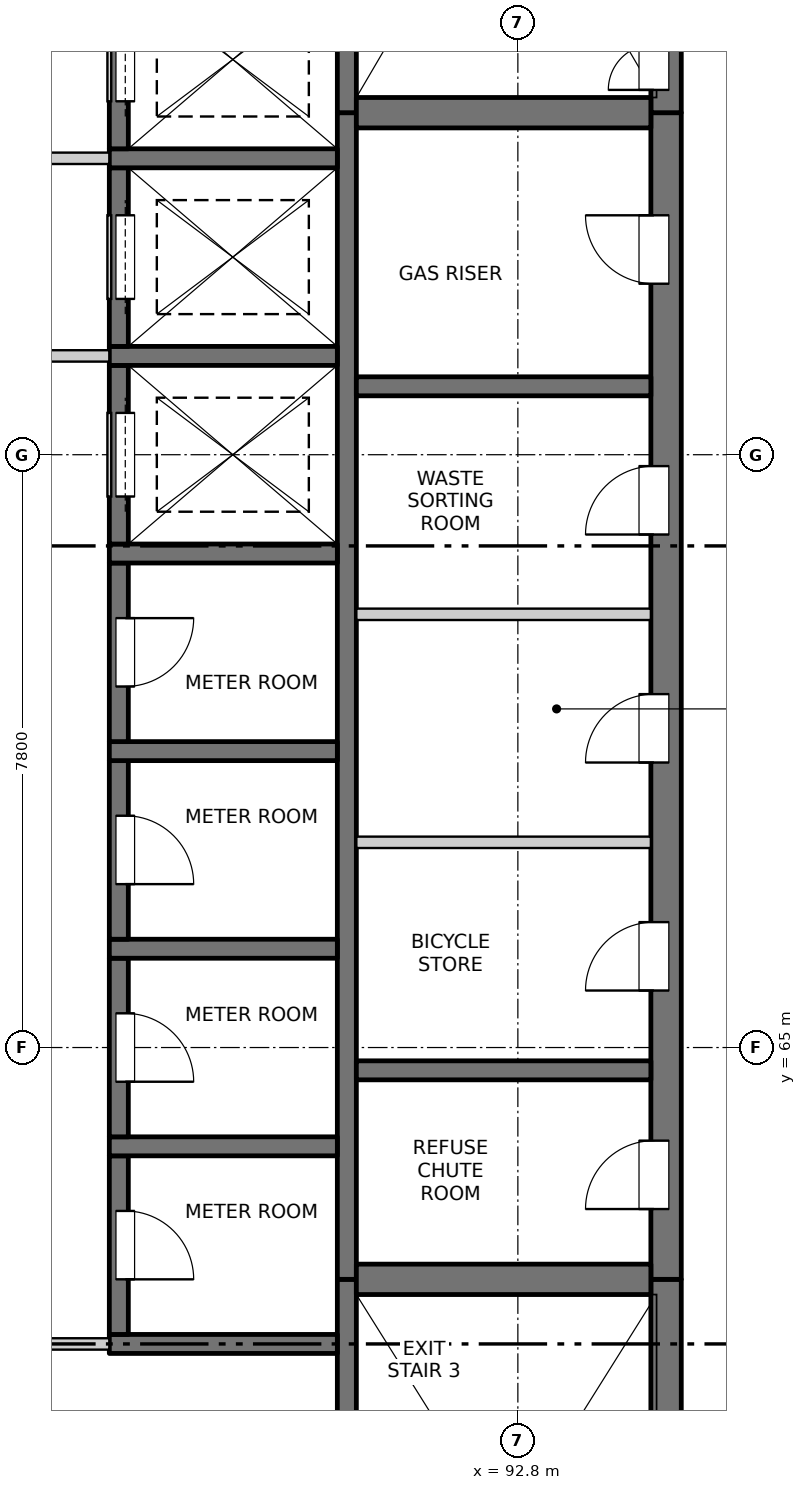
"""IFC4 building model, lengths in metres.
Left out: names, types, materials, properties, quantities, classifications, styles, units other than length and angle.
Written with IfcOpenShell. Run it as: python <this file> out.ifc"""

import sys

from ifc_helpers import new_model, si_unit, direction, frame, frame_2d, origin, place, context, subcontext, project, spatial, rectangle, extrude, element, fill, save


model = new_model("IFC4")
c1 = context("Model", 3, precision=1e-05, world=origin(), true_north=direction((0.0, 1.0)))
c2 = subcontext(c1, "Body", "Model", "MODEL_VIEW")
j1 = project(units=[si_unit("LENGTHUNIT", "METRE"), si_unit("PLANEANGLEUNIT", "RADIAN")], contexts=[c1])
p1 = place(None, origin())
s1 = spatial("IfcSite", under=j1, at=p1, CompositionType="ELEMENT")
p2 = place(p1, origin())
s2 = spatial("IfcBuilding", under=s1, at=p2, CompositionType="ELEMENT")
p3 = place(p2, frame((0.0, 0.0, 256.2)))
s3 = spatial("IfcBuildingStorey", under=s2, at=p3, CompositionType="ELEMENT", Elevation=256.2)
p4 = place(p3, frame((94.75, 55.05, -0.25), z_axis=(0.0, 0.0, 1.0), x_axis=(0.0, 1.0, 0.0)))
e1 = element("IfcWall", 1, at=p4, inside=s3, PredefinedType="SOLIDWALL", context=c2, shape_type="SweptSolid", body=[
    extrude(rectangle(XDim=6.9, YDim=0.4, at=frame_2d((3.45, 0.0))), origin(), (0.0, 0.0, 1.0), 3.4),
])
p5 = place(p4, frame((0.6, 0.0, 0.25)))
e2 = element("IfcOpeningElement", 2, at=p5, cuts=e1, PredefinedType="OPENING", context=c2, shape_type="SweptSolid", body=[
    extrude(rectangle(XDim=1.2, YDim=2.1, at=frame_2d((0.6, 1.05))), frame((0.0, 0.21, 0.0), z_axis=(0.0, -1.0, 0.0), x_axis=(1.0, 0.0, 0.0)), (0.0, 0.0, 1.0), 0.42),
])
p6 = place(p3, frame((94.75, 61.95, -0.25), z_axis=(0.0, 0.0, 1.0), x_axis=(0.0, 1.0, 0.0)))
e3 = element("IfcWall", 3, at=p6, inside=s3, PredefinedType="SOLIDWALL", context=c2, shape_type="SweptSolid", body=[
    extrude(rectangle(XDim=15.35, YDim=0.4, at=frame_2d((7.675, 0.0))), origin(), (0.0, 0.0, 1.0), 3.4),
])
p7 = place(p6, frame((0.925, 0.0, 0.25)))
e4 = element("IfcOpeningElement", 4, at=p7, cuts=e3, PredefinedType="OPENING", context=c2, shape_type="SweptSolid", body=[
    extrude(rectangle(XDim=0.9, YDim=2.1, at=frame_2d((0.45, 1.05))), frame((0.0, 0.21, 0.0), z_axis=(0.0, -1.0, 0.0), x_axis=(1.0, 0.0, 0.0)), (0.0, 0.0, 1.0), 0.42),
])
p8 = place(p6, frame((3.8, 0.0, 0.25)))
e5 = element("IfcOpeningElement", 5, at=p8, cuts=e3, PredefinedType="OPENING", context=c2, shape_type="SweptSolid", body=[
    extrude(rectangle(XDim=0.9, YDim=2.1, at=frame_2d((0.45, 1.05))), frame((0.0, 0.21, 0.0), z_axis=(0.0, -1.0, 0.0), x_axis=(1.0, 0.0, 0.0)), (0.0, 0.0, 1.0), 0.42),
])
p9 = place(p6, frame((6.8, 0.0, 0.25)))
e6 = element("IfcOpeningElement", 6, at=p9, cuts=e3, PredefinedType="OPENING", context=c2, shape_type="SweptSolid", body=[
    extrude(rectangle(XDim=0.9, YDim=2.1, at=frame_2d((0.45, 1.05))), frame((0.0, 0.21, 0.0), z_axis=(0.0, -1.0, 0.0), x_axis=(1.0, 0.0, 0.0)), (0.0, 0.0, 1.0), 0.42),
])
p10 = place(p6, frame((9.8, 0.0, 0.25)))
e7 = element("IfcOpeningElement", 7, at=p10, cuts=e3, PredefinedType="OPENING", context=c2, shape_type="SweptSolid", body=[
    extrude(rectangle(XDim=0.9, YDim=2.1, at=frame_2d((0.45, 1.05))), frame((0.0, 0.21, 0.0), z_axis=(0.0, -1.0, 0.0), x_axis=(1.0, 0.0, 0.0)), (0.0, 0.0, 1.0), 0.42),
])
p11 = place(p6, frame((13.1, 0.0, 0.25)))
e8 = element("IfcOpeningElement", 8, at=p11, cuts=e3, PredefinedType="OPENING", context=c2, shape_type="SweptSolid", body=[
    extrude(rectangle(XDim=0.9, YDim=2.1, at=frame_2d((0.45, 1.05))), frame((0.0, 0.21, 0.0), z_axis=(0.0, -1.0, 0.0), x_axis=(1.0, 0.0, 0.0)), (0.0, 0.0, 1.0), 0.42),
])
p12 = place(p3, frame((94.75, 77.3, -0.25), z_axis=(0.0, 0.0, 1.0), x_axis=(0.0, 1.0, 0.0)))
e9 = element("IfcWall", 9, at=p12, inside=s3, PredefinedType="SOLIDWALL", context=c2, shape_type="SweptSolid", body=[
    extrude(rectangle(XDim=7.4, YDim=0.4, at=frame_2d((3.7, 0.0))), origin(), (0.0, 0.0, 1.0), 3.4),
])
p13 = place(p12, frame((0.3, 0.0, 0.25)))
e10 = element("IfcOpeningElement", 10, at=p13, cuts=e9, PredefinedType="OPENING", context=c2, shape_type="SweptSolid", body=[
    extrude(rectangle(XDim=1.2, YDim=2.1, at=frame_2d((0.6, 1.05))), frame((0.0, 0.21, 0.0), z_axis=(0.0, -1.0, 0.0), x_axis=(1.0, 0.0, 0.0)), (0.0, 0.0, 1.0), 0.42),
])
p14 = place(p3, frame((90.55, 55.45, -0.25), z_axis=(0.0, 0.0, 1.0), x_axis=(0.0, 1.0, 0.0)))
e11 = element("IfcWall", 11, at=p14, inside=s3, PredefinedType="SOLIDWALL", context=c2, shape_type="SweptSolid", body=[
    extrude(rectangle(XDim=6.5, YDim=0.25, at=frame_2d((3.25, 0.0))), origin(), (0.0, 0.0, 1.0), 3.4),
])
p15 = place(p14, frame((0.2, 0.0, 0.25)))
e12 = element("IfcOpeningElement", 12, at=p15, cuts=e11, PredefinedType="OPENING", context=c2, shape_type="SweptSolid", body=[
    extrude(rectangle(XDim=1.2, YDim=2.1, at=frame_2d((0.6, 1.05))), frame((0.0, 0.135, 0.0), z_axis=(0.0, -1.0, 0.0), x_axis=(1.0, 0.0, 0.0)), (0.0, 0.0, 1.0), 0.27),
])
p16 = place(p3, frame((90.55, 61.95, -0.25), z_axis=(0.0, 0.0, 1.0), x_axis=(0.0, 1.0, 0.0)))
e13 = element("IfcWall", 13, at=p16, inside=s3, PredefinedType="SOLIDWALL", context=c2, shape_type="SweptSolid", body=[
    extrude(rectangle(XDim=15.35, YDim=0.25, at=frame_2d((7.675, 0.0))), origin(), (0.0, 0.0, 1.0), 3.4),
])
p17 = place(p3, frame((90.55, 77.3, -0.25), z_axis=(0.0, 0.0, 1.0), x_axis=(0.0, 1.0, 0.0)))
e14 = element("IfcWall", 14, at=p17, inside=s3, PredefinedType="SOLIDWALL", context=c2, shape_type="SweptSolid", body=[
    extrude(rectangle(XDim=7.0, YDim=0.25, at=frame_2d((3.5, 0.0))), origin(), (0.0, 0.0, 1.0), 3.4),
])
p18 = place(p3, frame((87.425, 61.1, -0.25), z_axis=(0.0, 0.0, 1.0), x_axis=(1.0, 0.0, 0.0)))
e15 = element("IfcWall", 15, at=p18, inside=s3, PredefinedType="SOLIDWALL", context=c2, shape_type="SweptSolid", body=[
    extrude(rectangle(XDim=3.0, YDim=0.25, at=frame_2d((1.5, 0.0))), origin(), (0.0, 0.0, 1.0), 3.4),
])
p19 = place(p3, frame((87.55, 61.225, -0.25), z_axis=(0.0, 0.0, 1.0), x_axis=(0.0, 1.0, 0.0)))
e16 = element("IfcWall", 16, at=p19, inside=s3, PredefinedType="SOLIDWALL", context=c2, shape_type="SweptSolid", body=[
    extrude(rectangle(XDim=2.35, YDim=0.25, at=frame_2d((1.175, 0.0))), origin(), (0.0, 0.0, 1.0), 3.4),
])
p20 = place(p19, frame((0.725, 0.0, 0.25)))
e17 = element("IfcOpeningElement", 17, at=p20, cuts=e16, PredefinedType="OPENING", context=c2, shape_type="SweptSolid", body=[
    extrude(rectangle(XDim=0.9, YDim=2.1, at=frame_2d((0.45, 1.05))), frame((0.0, 0.135, 0.0), z_axis=(0.0, -1.0, 0.0), x_axis=(1.0, 0.0, 0.0)), (0.0, 0.0, 1.0), 0.27),
])
p21 = place(p3, frame((87.425, 63.7, -0.25), z_axis=(0.0, 0.0, 1.0), x_axis=(1.0, 0.0, 0.0)))
e18 = element("IfcWall", 18, at=p21, inside=s3, PredefinedType="SOLIDWALL", context=c2, shape_type="SweptSolid", body=[
    extrude(rectangle(XDim=3.0, YDim=0.25, at=frame_2d((1.5, 0.0))), origin(), (0.0, 0.0, 1.0), 3.4),
])
p22 = place(p3, frame((87.55, 63.825, -0.25), z_axis=(0.0, 0.0, 1.0), x_axis=(0.0, 1.0, 0.0)))
e19 = element("IfcWall", 19, at=p22, inside=s3, PredefinedType="SOLIDWALL", context=c2, shape_type="SweptSolid", body=[
    extrude(rectangle(XDim=2.35, YDim=0.25, at=frame_2d((1.175, 0.0))), origin(), (0.0, 0.0, 1.0), 3.4),
])
p23 = place(p22, frame((0.725, 0.0, 0.25)))
e20 = element("IfcOpeningElement", 20, at=p23, cuts=e19, PredefinedType="OPENING", context=c2, shape_type="SweptSolid", body=[
    extrude(rectangle(XDim=0.9, YDim=2.1, at=frame_2d((0.45, 1.05))), frame((0.0, 0.135, 0.0), z_axis=(0.0, -1.0, 0.0), x_axis=(1.0, 0.0, 0.0)), (0.0, 0.0, 1.0), 0.27),
])
p24 = place(p3, frame((87.425, 66.3, -0.25), z_axis=(0.0, 0.0, 1.0), x_axis=(1.0, 0.0, 0.0)))
e21 = element("IfcWall", 21, at=p24, inside=s3, PredefinedType="SOLIDWALL", context=c2, shape_type="SweptSolid", body=[
    extrude(rectangle(XDim=3.0, YDim=0.25, at=frame_2d((1.5, 0.0))), origin(), (0.0, 0.0, 1.0), 3.4),
])
p25 = place(p3, frame((87.55, 66.425, -0.25), z_axis=(0.0, 0.0, 1.0), x_axis=(0.0, 1.0, 0.0)))
e22 = element("IfcWall", 22, at=p25, inside=s3, PredefinedType="SOLIDWALL", context=c2, shape_type="SweptSolid", body=[
    extrude(rectangle(XDim=2.35, YDim=0.25, at=frame_2d((1.175, 0.0))), origin(), (0.0, 0.0, 1.0), 3.4),
])
p26 = place(p25, frame((0.725, 0.0, 0.25)))
e23 = element("IfcOpeningElement", 23, at=p26, cuts=e22, PredefinedType="OPENING", context=c2, shape_type="SweptSolid", body=[
    extrude(rectangle(XDim=0.9, YDim=2.1, at=frame_2d((0.45, 1.05))), frame((0.0, 0.135, 0.0), z_axis=(0.0, -1.0, 0.0), x_axis=(1.0, 0.0, 0.0)), (0.0, 0.0, 1.0), 0.27),
])
p27 = place(p3, frame((87.425, 68.9, -0.25), z_axis=(0.0, 0.0, 1.0), x_axis=(1.0, 0.0, 0.0)))
e24 = element("IfcWall", 24, at=p27, inside=s3, PredefinedType="SOLIDWALL", context=c2, shape_type="SweptSolid", body=[
    extrude(rectangle(XDim=3.0, YDim=0.25, at=frame_2d((1.5, 0.0))), origin(), (0.0, 0.0, 1.0), 3.4),
])
p28 = place(p3, frame((87.55, 69.025, -0.25), z_axis=(0.0, 0.0, 1.0), x_axis=(0.0, 1.0, 0.0)))
e25 = element("IfcWall", 25, at=p28, inside=s3, PredefinedType="SOLIDWALL", context=c2, shape_type="SweptSolid", body=[
    extrude(rectangle(XDim=2.35, YDim=0.25, at=frame_2d((1.175, 0.0))), origin(), (0.0, 0.0, 1.0), 3.4),
])
p29 = place(p28, frame((0.725, 0.0, 0.25)))
e26 = element("IfcOpeningElement", 26, at=p29, cuts=e25, PredefinedType="OPENING", context=c2, shape_type="SweptSolid", body=[
    extrude(rectangle(XDim=0.9, YDim=2.1, at=frame_2d((0.45, 1.05))), frame((0.0, 0.135, 0.0), z_axis=(0.0, -1.0, 0.0), x_axis=(1.0, 0.0, 0.0)), (0.0, 0.0, 1.0), 0.27),
])
p30 = place(p3, frame((87.425, 71.5, -0.25), z_axis=(0.0, 0.0, 1.0), x_axis=(1.0, 0.0, 0.0)))
e27 = element("IfcWall", 27, at=p30, inside=s3, PredefinedType="SOLIDWALL", context=c2, shape_type="SweptSolid", body=[
    extrude(rectangle(XDim=3.0, YDim=0.25, at=frame_2d((1.5, 0.0))), origin(), (0.0, 0.0, 1.0), 3.4),
])
p31 = place(p3, frame((87.55, 71.625, -0.25), z_axis=(0.0, 0.0, 1.0), x_axis=(0.0, 1.0, 0.0)))
e28 = element("IfcWall", 28, at=p31, inside=s3, PredefinedType="SOLIDWALL", context=c2, shape_type="SweptSolid", body=[
    extrude(rectangle(XDim=2.35, YDim=0.25, at=frame_2d((1.175, 0.0))), origin(), (0.0, 0.0, 1.0), 3.4),
])
p32 = place(p31, frame((0.625, 0.0, 0.25)))
e29 = element("IfcOpeningElement", 29, at=p32, cuts=e28, PredefinedType="OPENING", context=c2, shape_type="SweptSolid", body=[
    extrude(rectangle(XDim=1.1, YDim=2.1, at=frame_2d((0.55, 1.05))), frame((0.0, 0.135, 0.0), z_axis=(0.0, -1.0, 0.0), x_axis=(1.0, 0.0, 0.0)), (0.0, 0.0, 1.0), 0.27),
])
p33 = place(p3, frame((87.425, 74.1, -0.25), z_axis=(0.0, 0.0, 1.0), x_axis=(1.0, 0.0, 0.0)))
e30 = element("IfcWall", 30, at=p33, inside=s3, PredefinedType="SOLIDWALL", context=c2, shape_type="SweptSolid", body=[
    extrude(rectangle(XDim=3.0, YDim=0.25, at=frame_2d((1.5, 0.0))), origin(), (0.0, 0.0, 1.0), 3.4),
])
p34 = place(p3, frame((87.55, 74.225, -0.25), z_axis=(0.0, 0.0, 1.0), x_axis=(0.0, 1.0, 0.0)))
e31 = element("IfcWall", 31, at=p34, inside=s3, PredefinedType="SOLIDWALL", context=c2, shape_type="SweptSolid", body=[
    extrude(rectangle(XDim=2.35, YDim=0.25, at=frame_2d((1.175, 0.0))), origin(), (0.0, 0.0, 1.0), 3.4),
])
p35 = place(p34, frame((0.625, 0.0, 0.25)))
e32 = element("IfcOpeningElement", 32, at=p35, cuts=e31, PredefinedType="OPENING", context=c2, shape_type="SweptSolid", body=[
    extrude(rectangle(XDim=1.1, YDim=2.1, at=frame_2d((0.55, 1.05))), frame((0.0, 0.135, 0.0), z_axis=(0.0, -1.0, 0.0), x_axis=(1.0, 0.0, 0.0)), (0.0, 0.0, 1.0), 0.27),
])
p36 = place(p3, frame((87.425, 76.7, -0.25), z_axis=(0.0, 0.0, 1.0), x_axis=(1.0, 0.0, 0.0)))
e33 = element("IfcWall", 33, at=p36, inside=s3, PredefinedType="SOLIDWALL", context=c2, shape_type="SweptSolid", body=[
    extrude(rectangle(XDim=3.0, YDim=0.25, at=frame_2d((1.5, 0.0))), origin(), (0.0, 0.0, 1.0), 3.4),
])
p37 = place(p3, frame((87.55, 76.825, -0.25), z_axis=(0.0, 0.0, 1.0), x_axis=(0.0, 1.0, 0.0)))
e34 = element("IfcWall", 34, at=p37, inside=s3, PredefinedType="SOLIDWALL", context=c2, shape_type="SweptSolid", body=[
    extrude(rectangle(XDim=2.35, YDim=0.25, at=frame_2d((1.175, 0.0))), origin(), (0.0, 0.0, 1.0), 3.4),
])
p38 = place(p37, frame((0.625, 0.0, 0.25)))
e35 = element("IfcOpeningElement", 35, at=p38, cuts=e34, PredefinedType="OPENING", context=c2, shape_type="SweptSolid", body=[
    extrude(rectangle(XDim=1.1, YDim=2.1, at=frame_2d((0.55, 1.05))), frame((0.0, 0.135, 0.0), z_axis=(0.0, -1.0, 0.0), x_axis=(1.0, 0.0, 0.0)), (0.0, 0.0, 1.0), 0.27),
])
p39 = place(p3, frame((90.675, 61.95, -0.25), z_axis=(0.0, 0.0, 1.0), x_axis=(1.0, 0.0, 0.0)))
e36 = element("IfcWall", 36, at=p39, inside=s3, PredefinedType="SOLIDWALL", context=c2, shape_type="SweptSolid", body=[
    extrude(rectangle(XDim=3.875, YDim=0.4, at=frame_2d((1.938, 0.0))), origin(), (0.0, 0.0, 1.0), 3.4),
])
for number, where, z_axis, x_axis in (
    (37, (90.675, 64.7, -0.25), (0.0, 0.0, 1.0), (1.0, 0.0, 0.0)),
    (38, (90.675, 73.7, -0.25), (0.0, 0.0, 1.0), (1.0, 0.0, 0.0)),
):
    element("IfcWall", number, at=place(p3, frame(where, z_axis=z_axis, x_axis=x_axis)), inside=s3, PredefinedType="SOLIDWALL", context=c2, shape_type="SweptSolid", body=[
        extrude(rectangle(XDim=3.875, YDim=0.25, at=frame_2d((1.938, 0.0))), origin(), (0.0, 0.0, 1.0), 3.4),
    ])
p40 = place(p3, frame((90.675, 77.3, -0.25), z_axis=(0.0, 0.0, 1.0), x_axis=(1.0, 0.0, 0.0)))
e39 = element("IfcWall", 39, at=p40, inside=s3, PredefinedType="SOLIDWALL", context=c2, shape_type="SweptSolid", body=[
    extrude(rectangle(XDim=3.875, YDim=0.4, at=frame_2d((1.938, 0.0))), origin(), (0.0, 0.0, 1.0), 3.4),
])
p41 = place(p3, frame((82.575, 61.1, 0.0), z_axis=(0.0, 0.0, 1.0), x_axis=(1.0, 0.0, 0.0)))
e40 = element("IfcWall", 40, at=p41, inside=s3, PredefinedType="PARTITIONING", context=c2, shape_type="SweptSolid", body=[
    extrude(rectangle(XDim=4.85, YDim=0.15, at=frame_2d((2.425, 0.0))), origin(), (0.0, 0.0, 1.0), 3.15),
])
p42 = place(p41, frame((1.525, 0.0, 0.0)))
e41 = element("IfcOpeningElement", 41, at=p42, cuts=e40, PredefinedType="OPENING", context=c2, shape_type="SweptSolid", body=[
    extrude(rectangle(XDim=1.8, YDim=2.1, at=frame_2d((0.9, 1.05))), frame((0.0, 0.085, 0.0), z_axis=(0.0, -1.0, 0.0), x_axis=(1.0, 0.0, 0.0)), (0.0, 0.0, 1.0), 0.17),
])
for number, where, z_axis, x_axis in (
    (42, (90.675, 67.7, 0.0), (0.0, 0.0, 1.0), (1.0, 0.0, 0.0)),
    (43, (90.675, 70.7, 0.0), (0.0, 0.0, 1.0), (1.0, 0.0, 0.0)),
):
    element("IfcWall", number, at=place(p3, frame(where, z_axis=z_axis, x_axis=x_axis)), inside=s3, PredefinedType="PARTITIONING", context=c2, shape_type="SweptSolid", body=[
        extrude(rectangle(XDim=3.875, YDim=0.15, at=frame_2d((1.938, 0.0))), origin(), (0.0, 0.0, 1.0), 3.15),
    ])
p43 = place(p3, frame((82.575, 74.1, 0.0), z_axis=(0.0, 0.0, 1.0), x_axis=(1.0, 0.0, 0.0)))
e44 = element("IfcWall", 44, at=p43, inside=s3, PredefinedType="PARTITIONING", context=c2, shape_type="SweptSolid", body=[
    extrude(rectangle(XDim=4.85, YDim=0.15, at=frame_2d((2.425, 0.0))), origin(), (0.0, 0.0, 1.0), 3.15),
])
p44 = place(p43, frame((1.525, 0.0, 0.0)))
e45 = element("IfcOpeningElement", 45, at=p44, cuts=e44, PredefinedType="OPENING", context=c2, shape_type="SweptSolid", body=[
    extrude(rectangle(XDim=1.8, YDim=2.1, at=frame_2d((0.9, 1.05))), frame((0.0, 0.085, 0.0), z_axis=(0.0, -1.0, 0.0), x_axis=(1.0, 0.0, 0.0)), (0.0, 0.0, 1.0), 0.17),
])
p45 = place(p3, frame((82.575, 76.7, 0.0), z_axis=(0.0, 0.0, 1.0), x_axis=(1.0, 0.0, 0.0)))
e46 = element("IfcWall", 46, at=p45, inside=s3, PredefinedType="PARTITIONING", context=c2, shape_type="SweptSolid", body=[
    extrude(rectangle(XDim=4.85, YDim=0.15, at=frame_2d((2.425, 0.0))), origin(), (0.0, 0.0, 1.0), 3.15),
])
p46 = place(p45, frame((1.525, 0.0, 0.0)))
e47 = element("IfcOpeningElement", 47, at=p46, cuts=e46, PredefinedType="OPENING", context=c2, shape_type="SweptSolid", body=[
    extrude(rectangle(XDim=1.8, YDim=2.1, at=frame_2d((0.9, 1.05))), frame((0.0, 0.085, 0.0), z_axis=(0.0, -1.0, 0.0), x_axis=(1.0, 0.0, 0.0)), (0.0, 0.0, 1.0), 0.17),
])
p47 = place(p20, origin())
e48 = element("IfcDoor", 48, at=p47, inside=s3, OperationType="SINGLE_SWING_RIGHT", PredefinedType="DOOR", context=c2, shape_type="SweptSolid", body=[
    extrude(rectangle(XDim=0.9, YDim=2.1, at=frame_2d((0.45, 1.05))), frame((0.0, -0.06, 0.0), z_axis=(0.0, -1.0, 0.0), x_axis=(1.0, 0.0, 0.0)), (0.0, 0.0, 1.0), 0.05),
])
fill(e17, e48)
p48 = place(p7, origin())
e49 = element("IfcDoor", 49, at=p48, inside=s3, OperationType="SINGLE_SWING_LEFT", PredefinedType="DOOR", context=c2, shape_type="SweptSolid", body=[
    extrude(rectangle(XDim=0.9, YDim=2.1, at=frame_2d((0.45, 1.05))), frame((0.0, 0.185, 0.0), z_axis=(0.0, -1.0, 0.0), x_axis=(1.0, 0.0, 0.0)), (0.0, 0.0, 1.0), 0.05),
])
fill(e4, e49)
p49 = place(p23, origin())
e50 = element("IfcDoor", 50, at=p49, inside=s3, OperationType="SINGLE_SWING_RIGHT", PredefinedType="DOOR", context=c2, shape_type="SweptSolid", body=[
    extrude(rectangle(XDim=0.9, YDim=2.1, at=frame_2d((0.45, 1.05))), frame((0.0, -0.06, 0.0), z_axis=(0.0, -1.0, 0.0), x_axis=(1.0, 0.0, 0.0)), (0.0, 0.0, 1.0), 0.05),
])
fill(e20, e50)
p50 = place(p8, origin())
e51 = element("IfcDoor", 51, at=p50, inside=s3, OperationType="SINGLE_SWING_LEFT", PredefinedType="DOOR", context=c2, shape_type="SweptSolid", body=[
    extrude(rectangle(XDim=0.9, YDim=2.1, at=frame_2d((0.45, 1.05))), frame((0.0, 0.185, 0.0), z_axis=(0.0, -1.0, 0.0), x_axis=(1.0, 0.0, 0.0)), (0.0, 0.0, 1.0), 0.05),
])
fill(e5, e51)
p51 = place(p26, origin())
e52 = element("IfcDoor", 52, at=p51, inside=s3, OperationType="SINGLE_SWING_RIGHT", PredefinedType="DOOR", context=c2, shape_type="SweptSolid", body=[
    extrude(rectangle(XDim=0.9, YDim=2.1, at=frame_2d((0.45, 1.05))), frame((0.0, -0.06, 0.0), z_axis=(0.0, -1.0, 0.0), x_axis=(1.0, 0.0, 0.0)), (0.0, 0.0, 1.0), 0.05),
])
fill(e23, e52)
p52 = place(p9, origin())
e53 = element("IfcDoor", 53, at=p52, inside=s3, OperationType="SINGLE_SWING_LEFT", PredefinedType="DOOR", context=c2, shape_type="SweptSolid", body=[
    extrude(rectangle(XDim=0.9, YDim=2.1, at=frame_2d((0.45, 1.05))), frame((0.0, 0.185, 0.0), z_axis=(0.0, -1.0, 0.0), x_axis=(1.0, 0.0, 0.0)), (0.0, 0.0, 1.0), 0.05),
])
fill(e6, e53)
p53 = place(p29, origin())
e54 = element("IfcDoor", 54, at=p53, inside=s3, OperationType="SINGLE_SWING_LEFT", PredefinedType="DOOR", context=c2, shape_type="SweptSolid", body=[
    extrude(rectangle(XDim=0.9, YDim=2.1, at=frame_2d((0.45, 1.05))), frame((0.0, -0.06, 0.0), z_axis=(0.0, -1.0, 0.0), x_axis=(1.0, 0.0, 0.0)), (0.0, 0.0, 1.0), 0.05),
])
fill(e26, e54)
p54 = place(p10, origin())
e55 = element("IfcDoor", 55, at=p54, inside=s3, OperationType="SINGLE_SWING_LEFT", PredefinedType="DOOR", context=c2, shape_type="SweptSolid", body=[
    extrude(rectangle(XDim=0.9, YDim=2.1, at=frame_2d((0.45, 1.05))), frame((0.0, 0.185, 0.0), z_axis=(0.0, -1.0, 0.0), x_axis=(1.0, 0.0, 0.0)), (0.0, 0.0, 1.0), 0.05),
])
fill(e7, e55)
p55 = place(p32, origin())
e56 = element("IfcDoor", 56, at=p55, inside=s3, OperationType="SLIDING_TO_LEFT", PredefinedType="DOOR", context=c2, shape_type="SweptSolid", body=[
    extrude(rectangle(XDim=1.1, YDim=2.1, at=frame_2d((0.55, 1.05))), frame((0.0, -0.06, 0.0), z_axis=(0.0, -1.0, 0.0), x_axis=(1.0, 0.0, 0.0)), (0.0, 0.0, 1.0), 0.05),
])
fill(e29, e56)
p56 = place(p35, origin())
e57 = element("IfcDoor", 57, at=p56, inside=s3, OperationType="SLIDING_TO_LEFT", PredefinedType="DOOR", context=c2, shape_type="SweptSolid", body=[
    extrude(rectangle(XDim=1.1, YDim=2.1, at=frame_2d((0.55, 1.05))), frame((0.0, -0.06, 0.0), z_axis=(0.0, -1.0, 0.0), x_axis=(1.0, 0.0, 0.0)), (0.0, 0.0, 1.0), 0.05),
])
fill(e32, e57)
p57 = place(p11, origin())
e58 = element("IfcDoor", 58, at=p57, inside=s3, OperationType="SINGLE_SWING_RIGHT", PredefinedType="DOOR", context=c2, shape_type="SweptSolid", body=[
    extrude(rectangle(XDim=0.9, YDim=2.1, at=frame_2d((0.45, 1.05))), frame((0.0, 0.185, 0.0), z_axis=(0.0, -1.0, 0.0), x_axis=(1.0, 0.0, 0.0)), (0.0, 0.0, 1.0), 0.05),
])
fill(e8, e58)
p58 = place(p38, origin())
e59 = element("IfcDoor", 59, at=p58, inside=s3, OperationType="SLIDING_TO_LEFT", PredefinedType="DOOR", context=c2, shape_type="SweptSolid", body=[
    extrude(rectangle(XDim=1.1, YDim=2.1, at=frame_2d((0.55, 1.05))), frame((0.0, -0.06, 0.0), z_axis=(0.0, -1.0, 0.0), x_axis=(1.0, 0.0, 0.0)), (0.0, 0.0, 1.0), 0.05),
])
fill(e35, e59)
p59 = place(p13, origin())
e60 = element("IfcDoor", 60, at=p59, inside=s3, OperationType="DOUBLE_DOOR_SINGLE_SWING", PredefinedType="DOOR", context=c2, shape_type="SweptSolid", body=[
    extrude(rectangle(XDim=1.2, YDim=2.1, at=frame_2d((0.6, 1.05))), frame((0.0, 0.185, 0.0), z_axis=(0.0, -1.0, 0.0), x_axis=(1.0, 0.0, 0.0)), (0.0, 0.0, 1.0), 0.05),
])
fill(e10, e60)
save(model, sys.argv[1])
